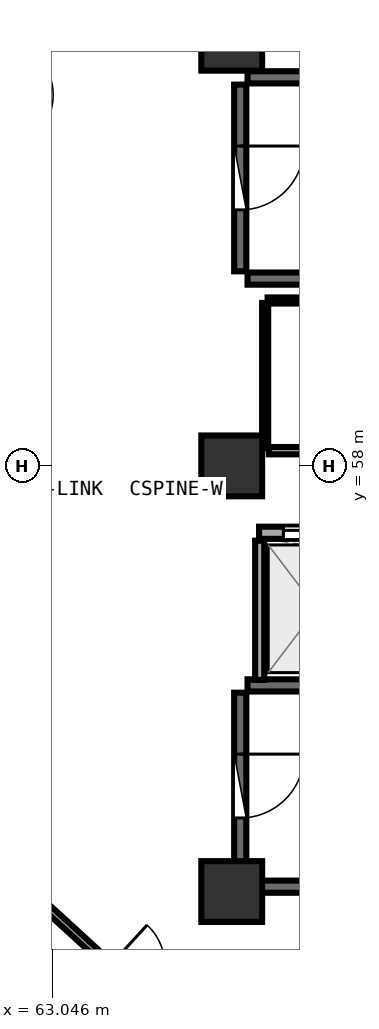
"""IFC4 building model, lengths in metres.
Left out: names, types, materials, properties, quantities, classifications, styles, units other than length and angle.
Written with IfcOpenShell. Run it as: python <this file> out.ifc"""

import sys

from ifc_helpers import new_model, si_unit, direction, frame, frame_2d, origin, origin_2d, place, context, subcontext, project, spatial, rectangle, extrude, element, fill, save


model = new_model("IFC4")
c1 = context("Model", 3, precision=1e-05, world=origin(), true_north=direction((0.0, 1.0)))
c2 = subcontext(c1, "Body", "Model", "MODEL_VIEW")
j1 = project(units=[si_unit("LENGTHUNIT", "METRE"), si_unit("PLANEANGLEUNIT", "RADIAN")], contexts=[c1])
p1 = place(None, origin())
s1 = spatial("IfcSite", under=j1, at=p1, CompositionType="ELEMENT")
p2 = place(p1, origin())
s2 = spatial("IfcBuilding", under=s1, at=p2, CompositionType="ELEMENT")
p3 = place(p2, frame((0.0, 0.0, 223.2)))
s3 = spatial("IfcBuildingStorey", under=s2, at=p3, CompositionType="ELEMENT", Elevation=223.2)
for number, where, z_axis, x_axis in (
    (1, (66.0, 51.0, 0.0), (0.0, 0.0, 1.0), (1.0, 0.0, 0.0)),
    (2, (66.0, 65.0, 0.0), (0.0, 0.0, 1.0), (1.0, 0.0, 0.0)),
    (3, (66.0, 58.0, 0.0), (0.0, 0.0, 1.0), (1.0, 0.0, 0.0)),
):
    element("IfcColumn", number, at=place(p3, frame(where, z_axis=z_axis, x_axis=x_axis)), inside=s3, PredefinedType="PILASTER", context=c2, shape_type="SweptSolid", body=[
        extrude(rectangle(XDim=1.0, YDim=1.0, at=origin_2d()), origin(), (0.0, 0.0, 1.0), 3.75),
    ])
for number, where, z_axis, x_axis in (
    (4, (66.26, 61.08, 0.0), (0.0, 0.0, 1.0), (1.0, 0.0, 0.0)),
    (5, (73.42, 64.39, 0.0), (0.0, 0.0, 1.0), (-1.0, 0.0, 0.0)),
):
    element("IfcWall", number, at=place(p3, frame(where, z_axis=z_axis, x_axis=x_axis)), inside=s3, PredefinedType="SHEAR", context=c2, shape_type="SweptSolid", body=[
        extrude(rectangle(XDim=7.16, YDim=0.2, at=frame_2d((3.58, 0.0))), origin(), (0.0, 0.0, 1.0), 3.49),
    ])
p4 = place(p3, frame((66.14, 64.27, 0.0), z_axis=(0.0, 0.0, 1.0), x_axis=(0.0, -1.0, 0.0)))
e6 = element("IfcWall", 6, at=p4, inside=s3, PredefinedType="SHEAR", context=c2, shape_type="SweptSolid", body=[
    extrude(rectangle(XDim=3.07, YDim=0.2, at=frame_2d((1.535, 0.0))), origin(), (0.0, 0.0, 1.0), 3.49),
])
p5 = place(p4, frame((1.01, 0.0, 0.0)))
e7 = element("IfcOpeningElement", 7, at=p5, cuts=e6, PredefinedType="OPENING", context=c2, shape_type="SweptSolid", body=[
    extrude(rectangle(XDim=1.05, YDim=2.1, at=frame_2d((0.525, 1.05))), frame((0.0, 0.11, 0.0), z_axis=(0.0, -1.0, 0.0), x_axis=(1.0, 0.0, 0.0)), (0.0, 0.0, 1.0), 0.22),
])
for number, where, z_axis, x_axis in (
    (8, (66.26, 51.08, 0.0), (0.0, 0.0, 1.0), (1.0, 0.0, 0.0)),
    (9, (73.42, 54.39, 0.0), (0.0, 0.0, 1.0), (-1.0, 0.0, 0.0)),
):
    element("IfcWall", number, at=place(p3, frame(where, z_axis=z_axis, x_axis=x_axis)), inside=s3, PredefinedType="SHEAR", context=c2, shape_type="SweptSolid", body=[
        extrude(rectangle(XDim=7.16, YDim=0.2, at=frame_2d((3.58, 0.0))), origin(), (0.0, 0.0, 1.0), 3.49),
    ])
p6 = place(p3, frame((66.14, 54.27, 0.0), z_axis=(0.0, 0.0, 1.0), x_axis=(0.0, -1.0, 0.0)))
e10 = element("IfcWall", 10, at=p6, inside=s3, PredefinedType="SHEAR", context=c2, shape_type="SweptSolid", body=[
    extrude(rectangle(XDim=3.07, YDim=0.2, at=frame_2d((1.535, 0.0))), origin(), (0.0, 0.0, 1.0), 3.49),
])
p7 = place(p6, frame((1.01, 0.0, 0.0)))
e11 = element("IfcOpeningElement", 11, at=p7, cuts=e10, PredefinedType="OPENING", context=c2, shape_type="SweptSolid", body=[
    extrude(rectangle(XDim=1.05, YDim=2.1, at=frame_2d((0.525, 1.05))), frame((0.0, 0.11, 0.0), z_axis=(0.0, -1.0, 0.0), x_axis=(1.0, 0.0, 0.0)), (0.0, 0.0, 1.0), 0.22),
])
p8 = place(p3, frame((66.45, 56.9, 0.0), z_axis=(0.0, 0.0, 1.0), x_axis=(1.0, 0.0, 0.0)))
e12 = element("IfcWall", 12, at=p8, inside=s3, PredefinedType="SOLIDWALL", context=c2, shape_type="SweptSolid", body=[
    extrude(rectangle(XDim=14.4, YDim=0.2, at=frame_2d((7.2, 0.0))), origin(), (0.0, 0.0, 1.0), 3.48),
])
p9 = place(p8, frame((0.4, 0.0, 0.0)))
e13 = element("IfcOpeningElement", 13, at=p9, cuts=e12, PredefinedType="OPENING", context=c2, shape_type="SweptSolid", body=[
    extrude(rectangle(XDim=1.1, YDim=2.1, at=frame_2d((0.55, 1.05))), frame((0.0, 0.11, 0.0), z_axis=(0.0, -1.0, 0.0), x_axis=(1.0, 0.0, 0.0)), (0.0, 0.0, 1.0), 0.22),
])
p10 = place(p8, frame((2.4, 0.0, 0.0)))
e14 = element("IfcOpeningElement", 14, at=p10, cuts=e12, PredefinedType="OPENING", context=c2, shape_type="SweptSolid", body=[
    extrude(rectangle(XDim=1.1, YDim=2.1, at=frame_2d((0.55, 1.05))), frame((0.0, 0.11, 0.0), z_axis=(0.0, -1.0, 0.0), x_axis=(1.0, 0.0, 0.0)), (0.0, 0.0, 1.0), 0.22),
])
p11 = place(p8, frame((4.4, 0.0, 0.0)))
e15 = element("IfcOpeningElement", 15, at=p11, cuts=e12, PredefinedType="OPENING", context=c2, shape_type="SweptSolid", body=[
    extrude(rectangle(XDim=1.1, YDim=2.1, at=frame_2d((0.55, 1.05))), frame((0.0, 0.11, 0.0), z_axis=(0.0, -1.0, 0.0), x_axis=(1.0, 0.0, 0.0)), (0.0, 0.0, 1.0), 0.22),
])
p12 = place(p3, frame((66.46, 54.48, 0.0), z_axis=(0.0, 0.0, 1.0), x_axis=(0.0, 1.0, 0.0)))
e16 = element("IfcWall", 16, at=p12, inside=s3, PredefinedType="PARTITIONING", context=c2, shape_type="SweptSolid", body=[
    extrude(rectangle(XDim=2.29, YDim=0.15, at=frame_2d((1.145, 0.0))), origin(), (0.0, 0.0, 1.0), 3.48),
])
p13 = place(p3, frame((66.61, 58.25, 0.0), z_axis=(0.0, 0.0, 1.0), x_axis=(1.0, 0.0, 0.0)))
e17 = element("IfcWall", 17, at=p13, inside=s3, PredefinedType="PARTITIONING", context=c2, shape_type="SweptSolid", body=[
    extrude(rectangle(XDim=5.78, YDim=0.12, at=frame_2d((2.89, 0.0))), origin(), (0.0, 0.0, 1.0), 3.48),
])
p14 = place(p13, frame((2.44, 0.0, 0.0)))
e18 = element("IfcOpeningElement", 18, at=p14, cuts=e17, PredefinedType="OPENING", context=c2, shape_type="SweptSolid", body=[
    extrude(rectangle(XDim=0.9, YDim=2.08, at=frame_2d((0.45, 1.04))), frame((0.0, 0.07, 0.0), z_axis=(0.0, -1.0, 0.0), x_axis=(1.0, 0.0, 0.0)), (0.0, 0.0, 1.0), 0.14),
])
p15 = place(p3, frame((62.803, 50.879, 0.0), z_axis=(0.0, 0.0, 1.0), x_axis=(0.737723633035, -0.675102837545, 0.0)))
e19 = element("IfcWall", 19, at=p15, inside=s3, PredefinedType="PARTITIONING", context=c2, shape_type="SweptSolid", body=[
    extrude(rectangle(XDim=4.144, YDim=0.12, at=frame_2d((2.072, 0.0))), origin(), (0.0, 0.0, 1.0), 3.025),
])
p16 = place(p15, frame((1.622, 0.0, 0.0)))
e20 = element("IfcOpeningElement", 20, at=p16, cuts=e19, PredefinedType="OPENING", context=c2, shape_type="SweptSolid", body=[
    extrude(rectangle(XDim=0.9, YDim=2.08, at=frame_2d((0.45, 1.04))), frame((0.0, 0.07, 0.0), z_axis=(0.0, -1.0, 0.0), x_axis=(1.0, 0.0, 0.0)), (0.0, 0.0, 1.0), 0.14),
])
p17 = place(p3, frame((72.41, 60.72, 0.0), z_axis=(0.0, 0.0, 1.0), x_axis=(-1.0, 0.0, 0.0)))
e21 = element("IfcWall", 21, at=p17, inside=s3, PredefinedType="PARTITIONING", context=c2, shape_type="SweptSolid", body=[
    extrude(rectangle(XDim=5.82, YDim=0.1, at=frame_2d((2.91, 0.0))), origin(), (0.0, 0.0, 1.0), 3.48),
])
p18 = place(p3, frame((66.55, 60.68, 0.0), z_axis=(0.0, 0.0, 1.0), x_axis=(0.0, -1.0, 0.0)))
e22 = element("IfcWall", 22, at=p18, inside=s3, PredefinedType="PARTITIONING", context=c2, shape_type="SweptSolid", body=[
    extrude(rectangle(XDim=2.39, YDim=0.1, at=frame_2d((1.195, 0.0))), origin(), (0.0, 0.0, 1.0), 3.48),
])
p19 = place(p5, origin())
e23 = element("IfcDoor", 23, at=p19, inside=s3, OperationType="SINGLE_SWING_LEFT", PredefinedType="DOOR", context=c2, shape_type="SweptSolid", body=[
    extrude(rectangle(XDim=1.05, YDim=2.1, at=frame_2d((0.525, 1.05))), frame((0.0, 0.025, 0.0), z_axis=(0.0, -1.0, 0.0), x_axis=(1.0, 0.0, 0.0)), (0.0, 0.0, 1.0), 0.05),
])
fill(e7, e23)
p20 = place(p7, origin())
e24 = element("IfcDoor", 24, at=p20, inside=s3, OperationType="SINGLE_SWING_LEFT", PredefinedType="DOOR", context=c2, shape_type="SweptSolid", body=[
    extrude(rectangle(XDim=1.05, YDim=2.1, at=frame_2d((0.525, 1.05))), frame((0.0, 0.025, 0.0), z_axis=(0.0, -1.0, 0.0), x_axis=(1.0, 0.0, 0.0)), (0.0, 0.0, 1.0), 0.05),
])
fill(e11, e24)
p21 = place(p9, origin())
e25 = element("IfcDoor", 25, at=p21, inside=s3, OperationType="DOUBLE_DOOR_SLIDING", PredefinedType="DOOR", context=c2, shape_type="SweptSolid", body=[
    extrude(rectangle(XDim=1.1, YDim=2.1, at=frame_2d((0.55, 1.05))), frame((0.0, 0.025, 0.0), z_axis=(0.0, -1.0, 0.0), x_axis=(1.0, 0.0, 0.0)), (0.0, 0.0, 1.0), 0.05),
])
fill(e13, e25)
save(model, sys.argv[1])
